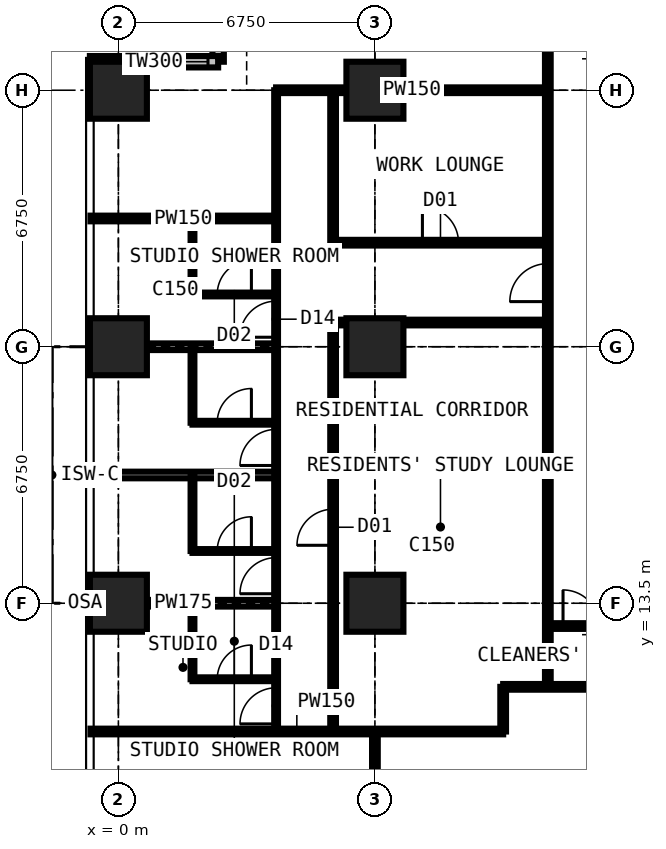
"""IFC4 building model, lengths in metres.
Left out: names, types, materials, properties, quantities, classifications, styles, units other than length and angle.
Written with IfcOpenShell. Run it as: python <this file> out.ifc"""

import sys

from ifc_helpers import new_model, si_unit, direction, frame, frame_2d, origin, origin_2d, place, context, subcontext, project, spatial, rectangle, extrude, element, fill, save


model = new_model("IFC4")
c1 = context("Model", 3, precision=1e-05, world=origin(), true_north=direction((0.0, 1.0)))
c2 = subcontext(c1, "Body", "Model", "MODEL_VIEW")
j1 = project(units=[si_unit("LENGTHUNIT", "METRE"), si_unit("PLANEANGLEUNIT", "RADIAN")], contexts=[c1])
p1 = place(None, origin())
s1 = spatial("IfcSite", under=j1, at=p1, CompositionType="ELEMENT")
p2 = place(p1, origin())
s2 = spatial("IfcBuilding", under=s1, at=p2, CompositionType="ELEMENT")
p3 = place(p2, frame((0.0, 0.0, 160.2)))
s3 = spatial("IfcBuildingStorey", under=s2, at=p3, CompositionType="ELEMENT", Elevation=160.2)
for number, where, z_axis, x_axis in (
    (1, (0.0, 13.5, 0.0), (0.0, 0.0, 1.0), (1.0, 0.0, 0.0)),
    (2, (0.0, 20.25, 0.0), (0.0, 0.0, 1.0), (1.0, 0.0, 0.0)),
    (3, (0.0, 27.0, 0.0), (0.0, 0.0, 1.0), (1.0, 0.0, 0.0)),
    (4, (6.75, 13.5, 0.0), (0.0, 0.0, 1.0), (1.0, 0.0, 0.0)),
    (5, (6.75, 20.25, 0.0), (0.0, 0.0, 1.0), (1.0, 0.0, 0.0)),
    (6, (6.75, 27.0, 0.0), (0.0, 0.0, 1.0), (1.0, 0.0, 0.0)),
):
    element("IfcColumn", number, at=place(p3, frame(where, z_axis=z_axis, x_axis=x_axis)), inside=s3, PredefinedType="COLUMN", context=c2, shape_type="SweptSolid", body=[
        extrude(rectangle(XDim=1.5, YDim=1.5, at=origin_2d()), origin(), (0.0, 0.0, 1.0), 3.6),
    ])
p4 = place(p3, frame((2.625, 31.125, 0.0), z_axis=(0.0, 0.0, 1.0), x_axis=(0.0, -1.0, 0.0)))
e7 = element("IfcWall", 7, at=p4, inside=s3, PredefinedType="SOLIDWALL", context=c2, shape_type="SweptSolid", body=[
    extrude(rectangle(XDim=3.375, YDim=0.3, at=frame_2d((1.688, 0.0))), origin(), (0.0, 0.0, 1.0), 3.375),
])
p5 = place(p4, frame((0.788, 0.0, 0.6)))
e8 = element("IfcOpeningElement", 8, at=p5, cuts=e7, PredefinedType="OPENING", context=c2, shape_type="SweptSolid", body=[
    extrude(rectangle(XDim=1.8, YDim=2.1, at=frame_2d((0.9, 1.05))), frame((0.0, 0.16, 0.0), z_axis=(0.0, -1.0, 0.0), x_axis=(1.0, 0.0, 0.0)), (0.0, 0.0, 1.0), 0.32),
])
p6 = place(p3, frame((2.625, 27.75, 0.0), z_axis=(0.0, 0.0, 1.0), x_axis=(-1.0, 0.0, 0.0)))
e9 = element("IfcWall", 9, at=p6, inside=s3, PredefinedType="SOLIDWALL", context=c2, shape_type="SweptSolid", body=[
    extrude(rectangle(XDim=3.375, YDim=0.3, at=frame_2d((1.688, 0.0))), origin(), (0.0, 0.0, 1.0), 3.375),
])
p7 = place(p6, frame((0.268, 0.0, 0.9)))
e10 = element("IfcOpeningElement", 10, at=p7, cuts=e9, PredefinedType="OPENING", context=c2, shape_type="SweptSolid", body=[
    extrude(rectangle(XDim=1.5, YDim=1.8, at=frame_2d((0.75, 0.9))), frame((0.0, 0.16, 0.0), z_axis=(0.0, -1.0, 0.0), x_axis=(1.0, 0.0, 0.0)), (0.0, 0.0, 1.0), 0.32),
])
p8 = place(p3, frame((-0.734, 10.125, 0.0), z_axis=(0.0, 0.0, 1.0), x_axis=(1.0, 0.0, 0.0)))
e11 = element("IfcWall", 11, at=p8, inside=s3, PredefinedType="PARTITIONING", context=c2, shape_type="SweptSolid", body=[
    extrude(rectangle(XDim=10.859, YDim=0.15, at=frame_2d((5.429, 0.0))), origin(), (0.0, 0.0, 1.0), 3.375),
])
p9 = place(p3, frame((-0.734, 13.5, 0.0), z_axis=(0.0, 0.0, 1.0), x_axis=(1.0, 0.0, 0.0)))
e12 = element("IfcWall", 12, at=p9, inside=s3, PredefinedType="PARTITIONING", context=c2, shape_type="SweptSolid", body=[
    extrude(rectangle(XDim=4.884, YDim=0.175, at=frame_2d((2.442, 0.0))), origin(), (0.0, 0.0, 1.0), 2.61),
])
p10 = place(p3, frame((-0.734, 16.875, 0.0), z_axis=(0.0, 0.0, 1.0), x_axis=(1.0, 0.0, 0.0)))
e13 = element("IfcWall", 13, at=p10, inside=s3, PredefinedType="PARTITIONING", context=c2, shape_type="SweptSolid", body=[
    extrude(rectangle(XDim=4.884, YDim=0.175, at=frame_2d((2.442, 0.0))), origin(), (0.0, 0.0, 1.0), 3.375),
])
p11 = place(p3, frame((-0.734, 20.25, 0.0), z_axis=(0.0, 0.0, 1.0), x_axis=(1.0, 0.0, 0.0)))
e14 = element("IfcWall", 14, at=p11, inside=s3, PredefinedType="PARTITIONING", context=c2, shape_type="SweptSolid", body=[
    extrude(rectangle(XDim=4.884, YDim=0.175, at=frame_2d((2.442, 0.0))), origin(), (0.0, 0.0, 1.0), 2.61),
])
p12 = place(p3, frame((-0.734, 23.625, 0.0), z_axis=(0.0, 0.0, 1.0), x_axis=(1.0, 0.0, 0.0)))
e15 = element("IfcWall", 15, at=p12, inside=s3, PredefinedType="PARTITIONING", context=c2, shape_type="SweptSolid", body=[
    extrude(rectangle(XDim=4.884, YDim=0.15, at=frame_2d((2.442, 0.0))), origin(), (0.0, 0.0, 1.0), 3.375),
])
p13 = place(p3, frame((1.95, 11.5, 0.0), z_axis=(0.0, 0.0, 1.0), x_axis=(0.0, 1.0, 0.0)))
e16 = element("IfcWall", 16, at=p13, inside=s3, PredefinedType="PARTITIONING", context=c2, shape_type="SweptSolid", body=[
    extrude(rectangle(XDim=2.0, YDim=0.1, at=frame_2d((1.0, 0.0))), origin(), (0.0, 0.0, 1.0), 3.375),
])
p14 = place(p3, frame((1.95, 11.5, 0.0), z_axis=(0.0, 0.0, 1.0), x_axis=(1.0, 0.0, 0.0)))
e17 = element("IfcWall", 17, at=p14, inside=s3, PredefinedType="PARTITIONING", context=c2, shape_type="SweptSolid", body=[
    extrude(rectangle(XDim=2.2, YDim=0.1, at=frame_2d((1.1, 0.0))), origin(), (0.0, 0.0, 1.0), 3.375),
])
p15 = place(p14, frame((0.65, 0.0, 0.0)))
e18 = element("IfcOpeningElement", 18, at=p15, cuts=e17, PredefinedType="OPENING", context=c2, shape_type="SweptSolid", body=[
    extrude(rectangle(XDim=0.9, YDim=2.2, at=frame_2d((0.45, 1.1))), frame((0.0, 0.06, 0.0), z_axis=(0.0, -1.0, 0.0), x_axis=(1.0, 0.0, 0.0)), (0.0, 0.0, 1.0), 0.12),
])
p16 = place(p3, frame((1.95, 14.875, 0.0), z_axis=(0.0, 0.0, 1.0), x_axis=(0.0, 1.0, 0.0)))
e19 = element("IfcWall", 19, at=p16, inside=s3, PredefinedType="PARTITIONING", context=c2, shape_type="SweptSolid", body=[
    extrude(rectangle(XDim=2.0, YDim=0.1, at=frame_2d((1.0, 0.0))), origin(), (0.0, 0.0, 1.0), 3.375),
])
p17 = place(p3, frame((1.95, 14.875, 0.0), z_axis=(0.0, 0.0, 1.0), x_axis=(1.0, 0.0, 0.0)))
e20 = element("IfcWall", 20, at=p17, inside=s3, PredefinedType="PARTITIONING", context=c2, shape_type="SweptSolid", body=[
    extrude(rectangle(XDim=2.2, YDim=0.1, at=frame_2d((1.1, 0.0))), origin(), (0.0, 0.0, 1.0), 3.375),
])
p18 = place(p17, frame((0.65, 0.0, 0.0)))
e21 = element("IfcOpeningElement", 21, at=p18, cuts=e20, PredefinedType="OPENING", context=c2, shape_type="SweptSolid", body=[
    extrude(rectangle(XDim=0.9, YDim=2.2, at=frame_2d((0.45, 1.1))), frame((0.0, 0.06, 0.0), z_axis=(0.0, -1.0, 0.0), x_axis=(1.0, 0.0, 0.0)), (0.0, 0.0, 1.0), 0.12),
])
p19 = place(p3, frame((1.95, 18.25, 0.0), z_axis=(0.0, 0.0, 1.0), x_axis=(0.0, 1.0, 0.0)))
e22 = element("IfcWall", 22, at=p19, inside=s3, PredefinedType="PARTITIONING", context=c2, shape_type="SweptSolid", body=[
    extrude(rectangle(XDim=2.0, YDim=0.1, at=frame_2d((1.0, 0.0))), origin(), (0.0, 0.0, 1.0), 3.375),
])
p20 = place(p3, frame((1.95, 18.25, 0.0), z_axis=(0.0, 0.0, 1.0), x_axis=(1.0, 0.0, 0.0)))
e23 = element("IfcWall", 23, at=p20, inside=s3, PredefinedType="PARTITIONING", context=c2, shape_type="SweptSolid", body=[
    extrude(rectangle(XDim=2.2, YDim=0.1, at=frame_2d((1.1, 0.0))), origin(), (0.0, 0.0, 1.0), 3.375),
])
p21 = place(p20, frame((0.65, 0.0, 0.0)))
e24 = element("IfcOpeningElement", 24, at=p21, cuts=e23, PredefinedType="OPENING", context=c2, shape_type="SweptSolid", body=[
    extrude(rectangle(XDim=0.9, YDim=2.2, at=frame_2d((0.45, 1.1))), frame((0.0, 0.06, 0.0), z_axis=(0.0, -1.0, 0.0), x_axis=(1.0, 0.0, 0.0)), (0.0, 0.0, 1.0), 0.12),
])
p22 = place(p3, frame((1.95, 21.625, 0.0), z_axis=(0.0, 0.0, 1.0), x_axis=(0.0, 1.0, 0.0)))
e25 = element("IfcWall", 25, at=p22, inside=s3, PredefinedType="PARTITIONING", context=c2, shape_type="SweptSolid", body=[
    extrude(rectangle(XDim=2.0, YDim=0.1, at=frame_2d((1.0, 0.0))), origin(), (0.0, 0.0, 1.0), 3.375),
])
p23 = place(p3, frame((1.95, 21.625, 0.0), z_axis=(0.0, 0.0, 1.0), x_axis=(1.0, 0.0, 0.0)))
e26 = element("IfcWall", 26, at=p23, inside=s3, PredefinedType="PARTITIONING", context=c2, shape_type="SweptSolid", body=[
    extrude(rectangle(XDim=2.2, YDim=0.1, at=frame_2d((1.1, 0.0))), origin(), (0.0, 0.0, 1.0), 3.375),
])
p24 = place(p23, frame((0.65, 0.0, 0.0)))
e27 = element("IfcOpeningElement", 27, at=p24, cuts=e26, PredefinedType="OPENING", context=c2, shape_type="SweptSolid", body=[
    extrude(rectangle(XDim=0.9, YDim=2.2, at=frame_2d((0.45, 1.1))), frame((0.0, 0.06, 0.0), z_axis=(0.0, -1.0, 0.0), x_axis=(1.0, 0.0, 0.0)), (0.0, 0.0, 1.0), 0.12),
])
p25 = place(p3, frame((4.15, 10.125, 0.0), z_axis=(0.0, 0.0, 1.0), x_axis=(0.0, 1.0, 0.0)))
e28 = element("IfcWall", 28, at=p25, inside=s3, PredefinedType="PARTITIONING", context=c2, shape_type="SweptSolid", body=[
    extrude(rectangle(XDim=16.875, YDim=0.1, at=frame_2d((8.438, 0.0))), origin(), (0.0, 0.0, 1.0), 3.375),
])
p26 = place(p25, frame((0.2, 0.0, 0.0)))
e29 = element("IfcOpeningElement", 29, at=p26, cuts=e28, PredefinedType="OPENING", context=c2, shape_type="SweptSolid", body=[
    extrude(rectangle(XDim=0.95, YDim=2.2, at=frame_2d((0.475, 1.1))), frame((0.0, 0.06, 0.0), z_axis=(0.0, -1.0, 0.0), x_axis=(1.0, 0.0, 0.0)), (0.0, 0.0, 1.0), 0.12),
])
p27 = place(p25, frame((3.625, 0.0, 0.0)))
e30 = element("IfcOpeningElement", 30, at=p27, cuts=e28, PredefinedType="OPENING", context=c2, shape_type="SweptSolid", body=[
    extrude(rectangle(XDim=0.95, YDim=2.2, at=frame_2d((0.475, 1.1))), frame((0.0, 0.06, 0.0), z_axis=(0.0, -1.0, 0.0), x_axis=(1.0, 0.0, 0.0)), (0.0, 0.0, 1.0), 0.12),
])
p28 = place(p25, frame((7.0, 0.0, 0.0)))
e31 = element("IfcOpeningElement", 31, at=p28, cuts=e28, PredefinedType="OPENING", context=c2, shape_type="SweptSolid", body=[
    extrude(rectangle(XDim=0.95, YDim=2.2, at=frame_2d((0.475, 1.1))), frame((0.0, 0.06, 0.0), z_axis=(0.0, -1.0, 0.0), x_axis=(1.0, 0.0, 0.0)), (0.0, 0.0, 1.0), 0.12),
])
p29 = place(p25, frame((10.375, 0.0, 0.0)))
e32 = element("IfcOpeningElement", 32, at=p29, cuts=e28, PredefinedType="OPENING", context=c2, shape_type="SweptSolid", body=[
    extrude(rectangle(XDim=0.95, YDim=2.2, at=frame_2d((0.475, 1.1))), frame((0.0, 0.06, 0.0), z_axis=(0.0, -1.0, 0.0), x_axis=(1.0, 0.0, 0.0)), (0.0, 0.0, 1.0), 0.12),
])
p30 = place(p3, frame((4.15, 27.0, 0.0), z_axis=(0.0, 0.0, 1.0), x_axis=(1.0, 0.0, 0.0)))
e33 = element("IfcWall", 33, at=p30, inside=s3, PredefinedType="PARTITIONING", context=c2, shape_type="SweptSolid", body=[
    extrude(rectangle(XDim=7.15, YDim=0.15, at=frame_2d((3.575, 0.0))), origin(), (0.0, 0.0, 1.0), 2.806),
])
p31 = place(p3, frame((5.65, 10.125, 0.0), z_axis=(0.0, 0.0, 1.0), x_axis=(0.0, 1.0, 0.0)))
e34 = element("IfcWall", 34, at=p31, inside=s3, PredefinedType="PARTITIONING", context=c2, shape_type="SweptSolid", body=[
    extrude(rectangle(XDim=10.762, YDim=0.15, at=frame_2d((5.381, 0.0))), origin(), (0.0, 0.0, 1.0), 3.375),
])
p32 = place(p31, frame((4.9, 0.0, 0.0)))
e35 = element("IfcOpeningElement", 35, at=p32, cuts=e34, PredefinedType="OPENING", context=c2, shape_type="SweptSolid", body=[
    extrude(rectangle(XDim=0.95, YDim=2.2, at=frame_2d((0.475, 1.1))), frame((0.0, 0.085, 0.0), z_axis=(0.0, -1.0, 0.0), x_axis=(1.0, 0.0, 0.0)), (0.0, 0.0, 1.0), 0.17),
])
p33 = place(p3, frame((5.65, 20.887, 0.0), z_axis=(0.0, 0.0, 1.0), x_axis=(1.0, 0.0, 0.0)))
e36 = element("IfcWall", 36, at=p33, inside=s3, PredefinedType="PARTITIONING", context=c2, shape_type="SweptSolid", body=[
    extrude(rectangle(XDim=5.65, YDim=0.15, at=frame_2d((2.825, 0.0))), origin(), (0.0, 0.0, 1.0), 3.375),
])
p34 = place(p3, frame((5.65, 22.988, 0.0), z_axis=(0.0, 0.0, 1.0), x_axis=(0.0, 1.0, 0.0)))
e37 = element("IfcWall", 37, at=p34, inside=s3, PredefinedType="PARTITIONING", context=c2, shape_type="SweptSolid", body=[
    extrude(rectangle(XDim=4.012, YDim=0.15, at=frame_2d((2.006, 0.0))), origin(), (0.0, 0.0, 1.0), 3.375),
])
p35 = place(p3, frame((5.65, 22.988, 0.0), z_axis=(0.0, 0.0, 1.0), x_axis=(1.0, 0.0, 0.0)))
e38 = element("IfcWall", 38, at=p35, inside=s3, PredefinedType="PARTITIONING", context=c2, shape_type="SweptSolid", body=[
    extrude(rectangle(XDim=5.65, YDim=0.15, at=frame_2d((2.825, 0.0))), origin(), (0.0, 0.0, 1.0), 3.375),
])
p36 = place(p35, frame((2.35, 0.0, 0.0)))
e39 = element("IfcOpeningElement", 39, at=p36, cuts=e38, PredefinedType="OPENING", context=c2, shape_type="SweptSolid", body=[
    extrude(rectangle(XDim=0.95, YDim=2.2, at=frame_2d((0.475, 1.1))), frame((0.0, 0.085, 0.0), z_axis=(0.0, -1.0, 0.0), x_axis=(1.0, 0.0, 0.0)), (0.0, 0.0, 1.0), 0.17),
])
p37 = place(p3, frame((6.75, 4.15, 0.0), z_axis=(0.0, 0.0, 1.0), x_axis=(0.0, 1.0, 0.0)))
e40 = element("IfcWall", 40, at=p37, inside=s3, PredefinedType="PARTITIONING", context=c2, shape_type="SweptSolid", body=[
    extrude(rectangle(XDim=5.975, YDim=0.15, at=frame_2d((2.988, 0.0))), origin(), (0.0, 0.0, 1.0), 2.877),
])
p38 = place(p3, frame((10.125, 10.125, 0.0), z_axis=(0.0, 0.0, 1.0), x_axis=(0.0, 1.0, 0.0)))
e41 = element("IfcWall", 41, at=p38, inside=s3, PredefinedType="PARTITIONING", context=c2, shape_type="SweptSolid", body=[
    extrude(rectangle(XDim=1.175, YDim=0.15, at=frame_2d((0.587, 0.0))), origin(), (0.0, 0.0, 1.0), 3.375),
])
p39 = place(p3, frame((10.125, 11.3, 0.0), z_axis=(0.0, 0.0, 1.0), x_axis=(1.0, 0.0, 0.0)))
e42 = element("IfcWall", 42, at=p39, inside=s3, PredefinedType="PARTITIONING", context=c2, shape_type="SweptSolid", body=[
    extrude(rectangle(XDim=20.25, YDim=0.15, at=frame_2d((10.125, 0.0))), origin(), (0.0, 0.0, 1.0), 3.375),
])
p40 = place(p39, frame((5.2, 0.0, 0.0)))
e43 = element("IfcOpeningElement", 43, at=p40, cuts=e42, PredefinedType="OPENING", context=c2, shape_type="SweptSolid", body=[
    extrude(rectangle(XDim=1.0, YDim=2.2, at=frame_2d((0.5, 1.1))), frame((0.0, 0.085, 0.0), z_axis=(0.0, -1.0, 0.0), x_axis=(1.0, 0.0, 0.0)), (0.0, 0.0, 1.0), 0.17),
])
p41 = place(p39, frame((11.312, 0.0, 0.0)))
e44 = element("IfcOpeningElement", 44, at=p41, cuts=e42, PredefinedType="OPENING", context=c2, shape_type="SweptSolid", body=[
    extrude(rectangle(XDim=1.0, YDim=2.2, at=frame_2d((0.5, 1.1))), frame((0.0, 0.085, 0.0), z_axis=(0.0, -1.0, 0.0), x_axis=(1.0, 0.0, 0.0)), (0.0, 0.0, 1.0), 0.17),
])
p42 = place(p39, frame((3.325, 0.0, 0.0)))
e45 = element("IfcOpeningElement", 45, at=p42, cuts=e42, PredefinedType="OPENING", context=c2, shape_type="SweptSolid", body=[
    extrude(rectangle(XDim=0.95, YDim=2.2, at=frame_2d((0.475, 1.1))), frame((0.0, 0.085, 0.0), z_axis=(0.0, -1.0, 0.0), x_axis=(1.0, 0.0, 0.0)), (0.0, 0.0, 1.0), 0.17),
])
p43 = place(p3, frame((11.3, 11.3, 0.0), z_axis=(0.0, 0.0, 1.0), x_axis=(0.0, 1.0, 0.0)))
e46 = element("IfcWall", 46, at=p43, inside=s3, PredefinedType="PARTITIONING", context=c2, shape_type="SweptSolid", body=[
    extrude(rectangle(XDim=19.3, YDim=0.15, at=frame_2d((9.65, 0.0))), origin(), (0.0, 0.0, 1.0), 3.375),
])
p44 = place(p43, frame((18.1, 0.0, 0.0)))
e47 = element("IfcOpeningElement", 47, at=p44, cuts=e46, PredefinedType="OPENING", context=c2, shape_type="SweptSolid", body=[
    extrude(rectangle(XDim=1.0, YDim=2.2, at=frame_2d((0.5, 1.1))), frame((0.0, 0.085, 0.0), z_axis=(0.0, -1.0, 0.0), x_axis=(1.0, 0.0, 0.0)), (0.0, 0.0, 1.0), 0.17),
])
p45 = place(p43, frame((10.137, 0.0, 0.0)))
e48 = element("IfcOpeningElement", 48, at=p45, cuts=e46, PredefinedType="OPENING", context=c2, shape_type="SweptSolid", body=[
    extrude(rectangle(XDim=1.0, YDim=2.2, at=frame_2d((0.5, 1.1))), frame((0.0, 0.085, 0.0), z_axis=(0.0, -1.0, 0.0), x_axis=(1.0, 0.0, 0.0)), (0.0, 0.0, 1.0), 0.17),
])
p46 = place(p3, frame((11.3, 12.9, 0.0), z_axis=(0.0, 0.0, 1.0), x_axis=(1.0, 0.0, 0.0)))
e49 = element("IfcWall", 49, at=p46, inside=s3, PredefinedType="PARTITIONING", context=c2, shape_type="SweptSolid", body=[
    extrude(rectangle(XDim=1.8, YDim=0.15, at=frame_2d((0.9, 0.0))), origin(), (0.0, 0.0, 1.0), 2.806),
])
p47 = place(p46, frame((0.4, 0.0, 0.0)))
e50 = element("IfcOpeningElement", 50, at=p47, cuts=e49, PredefinedType="OPENING", context=c2, shape_type="SweptSolid", body=[
    extrude(rectangle(XDim=0.95, YDim=2.2, at=frame_2d((0.475, 1.1))), frame((0.0, 0.085, 0.0), z_axis=(0.0, -1.0, 0.0), x_axis=(1.0, 0.0, 0.0)), (0.0, 0.0, 1.0), 0.17),
])
p48 = place(p7, origin())
e51 = element("IfcWindow", 51, at=p48, inside=s3, PartitioningType="SINGLE_PANEL", PredefinedType="WINDOW", context=c2, shape_type="SweptSolid", body=[
    extrude(rectangle(XDim=1.5, YDim=1.8, at=frame_2d((0.75, 0.9))), frame((0.0, 0.03, 0.0), z_axis=(0.0, -1.0, 0.0), x_axis=(1.0, 0.0, 0.0)), (0.0, 0.0, 1.0), 0.06),
])
fill(e10, e51)
p49 = place(p47, origin())
e52 = element("IfcDoor", 52, at=p49, inside=s3, OperationType="SINGLE_SWING_LEFT", PredefinedType="DOOR", context=c2, shape_type="SweptSolid", body=[
    extrude(rectangle(XDim=0.95, YDim=2.2, at=frame_2d((0.475, 1.1))), frame((0.0, 0.025, 0.0), z_axis=(0.0, -1.0, 0.0), x_axis=(1.0, 0.0, 0.0)), (0.0, 0.0, 1.0), 0.05),
])
fill(e50, e52)
p50 = place(p26, origin())
e53 = element("IfcDoor", 53, at=p50, inside=s3, OperationType="SINGLE_SWING_LEFT", PredefinedType="DOOR", context=c2, shape_type="SweptSolid", body=[
    extrude(rectangle(XDim=0.95, YDim=2.2, at=frame_2d((0.475, 1.1))), frame((0.0, 0.025, 0.0), z_axis=(0.0, -1.0, 0.0), x_axis=(1.0, 0.0, 0.0)), (0.0, 0.0, 1.0), 0.05),
])
fill(e29, e53)
p51 = place(p15, origin())
e54 = element("IfcDoor", 54, at=p51, inside=s3, OperationType="SINGLE_SWING_RIGHT", PredefinedType="DOOR", context=c2, shape_type="SweptSolid", body=[
    extrude(rectangle(XDim=0.9, YDim=2.2, at=frame_2d((0.45, 1.1))), frame((0.0, 0.025, 0.0), z_axis=(0.0, -1.0, 0.0), x_axis=(1.0, 0.0, 0.0)), (0.0, 0.0, 1.0), 0.05),
])
fill(e18, e54)
p52 = place(p27, origin())
e55 = element("IfcDoor", 55, at=p52, inside=s3, OperationType="SINGLE_SWING_LEFT", PredefinedType="DOOR", context=c2, shape_type="SweptSolid", body=[
    extrude(rectangle(XDim=0.95, YDim=2.2, at=frame_2d((0.475, 1.1))), frame((0.0, 0.025, 0.0), z_axis=(0.0, -1.0, 0.0), x_axis=(1.0, 0.0, 0.0)), (0.0, 0.0, 1.0), 0.05),
])
fill(e30, e55)
p53 = place(p18, origin())
e56 = element("IfcDoor", 56, at=p53, inside=s3, OperationType="SINGLE_SWING_RIGHT", PredefinedType="DOOR", context=c2, shape_type="SweptSolid", body=[
    extrude(rectangle(XDim=0.9, YDim=2.2, at=frame_2d((0.45, 1.1))), frame((0.0, 0.025, 0.0), z_axis=(0.0, -1.0, 0.0), x_axis=(1.0, 0.0, 0.0)), (0.0, 0.0, 1.0), 0.05),
])
fill(e21, e56)
p54 = place(p28, origin())
e57 = element("IfcDoor", 57, at=p54, inside=s3, OperationType="SINGLE_SWING_LEFT", PredefinedType="DOOR", context=c2, shape_type="SweptSolid", body=[
    extrude(rectangle(XDim=0.95, YDim=2.2, at=frame_2d((0.475, 1.1))), frame((0.0, 0.025, 0.0), z_axis=(0.0, -1.0, 0.0), x_axis=(1.0, 0.0, 0.0)), (0.0, 0.0, 1.0), 0.05),
])
fill(e31, e57)
p55 = place(p21, origin())
e58 = element("IfcDoor", 58, at=p55, inside=s3, OperationType="SINGLE_SWING_RIGHT", PredefinedType="DOOR", context=c2, shape_type="SweptSolid", body=[
    extrude(rectangle(XDim=0.9, YDim=2.2, at=frame_2d((0.45, 1.1))), frame((0.0, 0.025, 0.0), z_axis=(0.0, -1.0, 0.0), x_axis=(1.0, 0.0, 0.0)), (0.0, 0.0, 1.0), 0.05),
])
fill(e24, e58)
p56 = place(p29, origin())
e59 = element("IfcDoor", 59, at=p56, inside=s3, OperationType="SINGLE_SWING_LEFT", PredefinedType="DOOR", context=c2, shape_type="SweptSolid", body=[
    extrude(rectangle(XDim=0.95, YDim=2.2, at=frame_2d((0.475, 1.1))), frame((0.0, 0.025, 0.0), z_axis=(0.0, -1.0, 0.0), x_axis=(1.0, 0.0, 0.0)), (0.0, 0.0, 1.0), 0.05),
])
fill(e32, e59)
p57 = place(p24, origin())
e60 = element("IfcDoor", 60, at=p57, inside=s3, OperationType="SINGLE_SWING_RIGHT", PredefinedType="DOOR", context=c2, shape_type="SweptSolid", body=[
    extrude(rectangle(XDim=0.9, YDim=2.2, at=frame_2d((0.45, 1.1))), frame((0.0, 0.025, 0.0), z_axis=(0.0, -1.0, 0.0), x_axis=(1.0, 0.0, 0.0)), (0.0, 0.0, 1.0), 0.05),
])
fill(e27, e60)
p58 = place(p45, origin())
e61 = element("IfcDoor", 61, at=p58, inside=s3, OperationType="SINGLE_SWING_LEFT", PredefinedType="DOOR", context=c2, shape_type="SweptSolid", body=[
    extrude(rectangle(XDim=1.0, YDim=2.2, at=frame_2d((0.5, 1.1))), frame((0.0, 0.025, 0.0), z_axis=(0.0, -1.0, 0.0), x_axis=(1.0, 0.0, 0.0)), (0.0, 0.0, 1.0), 0.05),
])
fill(e48, e61)
p59 = place(p32, origin())
e62 = element("IfcDoor", 62, at=p59, inside=s3, OperationType="SINGLE_SWING_LEFT", PredefinedType="DOOR", context=c2, shape_type="SweptSolid", body=[
    extrude(rectangle(XDim=0.95, YDim=2.2, at=frame_2d((0.475, 1.1))), frame((0.0, 0.025, 0.0), z_axis=(0.0, -1.0, 0.0), x_axis=(1.0, 0.0, 0.0)), (0.0, 0.0, 1.0), 0.05),
])
fill(e35, e62)
p60 = place(p36, origin())
e63 = element("IfcDoor", 63, at=p60, inside=s3, OperationType="SINGLE_SWING_LEFT", PredefinedType="DOOR", context=c2, shape_type="SweptSolid", body=[
    extrude(rectangle(XDim=0.95, YDim=2.2, at=frame_2d((0.475, 1.1))), frame((0.0, 0.025, 0.0), z_axis=(0.0, -1.0, 0.0), x_axis=(1.0, 0.0, 0.0)), (0.0, 0.0, 1.0), 0.05),
])
fill(e39, e63)
save(model, sys.argv[1])
